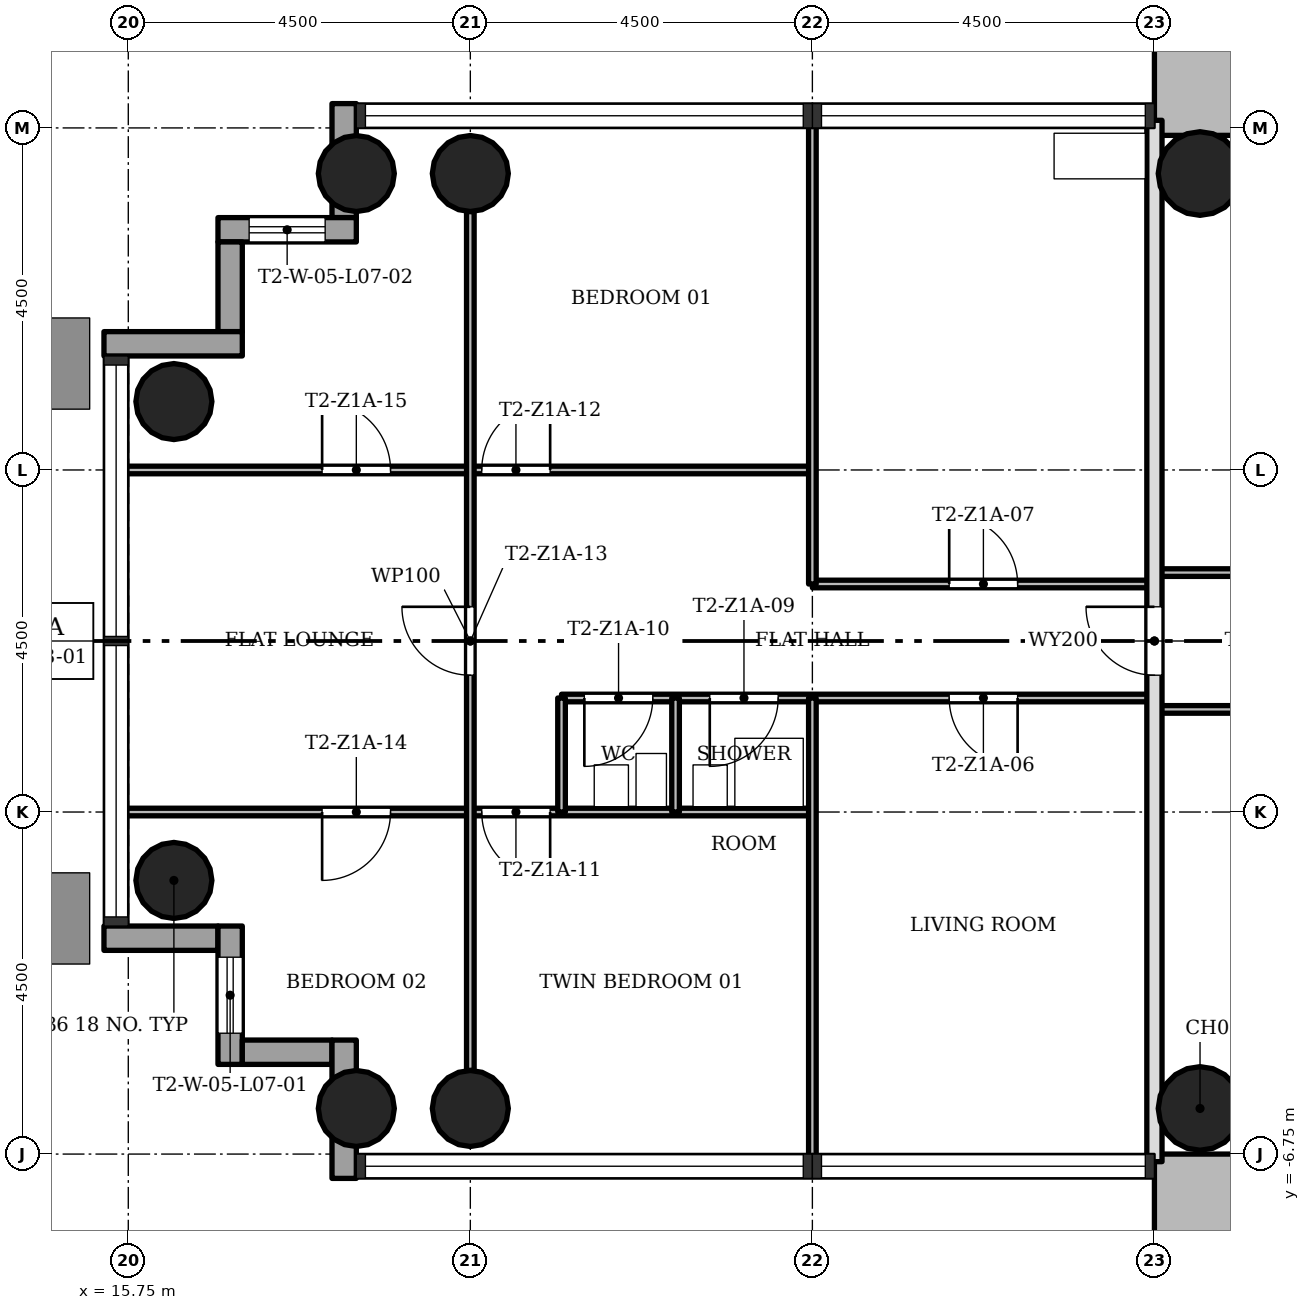
"""IFC4 building model, lengths in metres.
Left out: names, types, materials, properties, quantities, classifications, styles, units other than length and angle.
Written with IfcOpenShell. Run it as: python <this file> out.ifc"""

import sys

from ifc_helpers import new_model, si_unit, direction, frame, frame_2d, origin, origin_2d, place, context, subcontext, project, spatial, rectangle, hollow_circle, extrude, element, fill, save


model = new_model("IFC4")
c1 = context("Model", 3, precision=1e-05, world=origin(), true_north=direction((0.0, 1.0)))
c2 = subcontext(c1, "Body", "Model", "MODEL_VIEW")
j1 = project(units=[si_unit("LENGTHUNIT", "METRE"), si_unit("PLANEANGLEUNIT", "RADIAN")], contexts=[c1])
p1 = place(None, origin())
s1 = spatial("IfcSite", under=j1, at=p1, CompositionType="ELEMENT")
p2 = place(p1, origin())
s2 = spatial("IfcBuilding", under=s1, at=p2, CompositionType="ELEMENT")
p3 = place(p2, frame((0.0, 0.0, 31.3)))
s3 = spatial("IfcBuildingStorey", under=s2, at=p3, CompositionType="ELEMENT", Elevation=31.3)
p4 = place(p3, frame((29.8, 15.248, 0.0), z_axis=(0.0, 0.0, 1.0), x_axis=(0.0, -1.0, 0.0)))
e1 = element("IfcWall", 1, at=p4, inside=s3, PredefinedType="SHEAR", context=c2, shape_type="SweptSolid", body=[
    extrude(rectangle(XDim=8.596, YDim=1.1, at=frame_2d((4.298, 0.0))), origin(), (0.0, 0.0, 1.0), 3.4),
])
p5 = place(p3, frame((41.65, -7.3, 0.0), z_axis=(0.0, 0.0, 1.0), x_axis=(-1.0, 0.0, 0.0)))
e2 = element("IfcWall", 2, at=p5, inside=s3, PredefinedType="SHEAR", context=c2, shape_type="SweptSolid", body=[
    extrude(rectangle(XDim=12.4, YDim=1.1, at=frame_2d((6.2, 0.0))), origin(), (0.0, 0.0, 1.0), 3.4),
])
p6 = place(p5, frame((4.75, 0.0, 0.0)))
e3 = element("IfcOpeningElement", 3, at=p6, cuts=e2, PredefinedType="OPENING", context=c2, shape_type="SweptSolid", body=[
    extrude(rectangle(XDim=1.8, YDim=2.1, at=frame_2d((0.9, 1.05))), frame((0.0, 0.56, 0.0), z_axis=(0.0, -1.0, 0.0), x_axis=(1.0, 0.0, 0.0)), (0.0, 0.0, 1.0), 1.12),
])
for number, where, z_axis, x_axis in (
    (4, (20.25, 6.15, 0.0), (0.0, 0.0, 1.0), (1.0, 0.0, 0.0)),
    (5, (20.25, -6.15, 0.0), (0.0, 0.0, 1.0), (1.0, 0.0, 0.0)),
    (6, (18.75, 6.15, 0.0), (0.0, 0.0, 1.0), (1.0, 0.0, 0.0)),
    (7, (18.75, -6.15, 0.0), (0.0, 0.0, 1.0), (1.0, 0.0, 0.0)),
    (8, (16.35, 3.15, 0.0), (0.0, 0.0, 1.0), (1.0, 0.0, 0.0)),
    (9, (16.35, -3.15, 0.0), (0.0, 0.0, 1.0), (1.0, 0.0, 0.0)),
):
    element("IfcColumn", number, at=place(p3, frame(where, z_axis=z_axis, x_axis=x_axis)), inside=s3, PredefinedType="COLUMN", context=c2, shape_type="SweptSolid", body=[
        extrude(hollow_circle(Radius=0.5, WallThickness=0.036, at=origin_2d()), origin(), (0.0, 0.0, 1.0), 3.4),
    ])
for number, where, z_axis, x_axis in (
    (10, (29.85, 6.15, 0.0), (0.0, 0.0, 1.0), (1.0, 0.0, 0.0)),
    (11, (29.85, -6.15, 0.0), (0.0, 0.0, 1.0), (1.0, 0.0, 0.0)),
):
    element("IfcColumn", number, at=place(p3, frame(where, z_axis=z_axis, x_axis=x_axis)), inside=s3, PredefinedType="COLUMN", context=c2, shape_type="SweptSolid", body=[
        extrude(hollow_circle(Radius=0.55, WallThickness=0.04, at=origin_2d()), origin(), (0.0, 0.0, 1.0), 3.4),
    ])
p7 = place(p3, frame((18.59, 7.07, -0.3), z_axis=(0.0, 0.0, 1.0), x_axis=(0.0, -1.0, 0.0)))
e12 = element("IfcWall", 12, at=p7, inside=s3, PredefinedType="STANDARD", context=c2, shape_type="SweptSolid", body=[
    extrude(rectangle(XDim=1.5, YDim=0.32, at=frame_2d((0.75, 0.0))), origin(), (0.0, 0.0, 1.0), 3.4),
])
p8 = place(p3, frame((18.75, 5.41, -0.3), z_axis=(0.0, 0.0, 1.0), x_axis=(-1.0, 0.0, 0.0)))
e13 = element("IfcWall", 13, at=p8, inside=s3, PredefinedType="STANDARD", context=c2, shape_type="SweptSolid", body=[
    extrude(rectangle(XDim=1.82, YDim=0.32, at=frame_2d((0.91, 0.0))), origin(), (0.0, 0.0, 1.0), 3.4),
])
p9 = place(p8, frame((0.41, 0.0, 1.2)))
e14 = element("IfcOpeningElement", 14, at=p9, cuts=e13, PredefinedType="OPENING", context=c2, shape_type="SweptSolid", body=[
    extrude(rectangle(XDim=1.0, YDim=1.5, at=frame_2d((0.5, 0.75))), frame((0.0, 0.17, 0.0), z_axis=(0.0, -1.0, 0.0), x_axis=(1.0, 0.0, 0.0)), (0.0, 0.0, 1.0), 0.34),
])
p10 = place(p3, frame((17.09, 5.25, -0.3), z_axis=(0.0, 0.0, 1.0), x_axis=(0.0, -1.0, 0.0)))
e15 = element("IfcWall", 15, at=p10, inside=s3, PredefinedType="STANDARD", context=c2, shape_type="SweptSolid", body=[
    extrude(rectangle(XDim=1.18, YDim=0.32, at=frame_2d((0.59, 0.0))), origin(), (0.0, 0.0, 1.0), 3.4),
])
p11 = place(p3, frame((17.25, 3.91, -0.3), z_axis=(0.0, 0.0, 1.0), x_axis=(-1.0, 0.0, 0.0)))
e16 = element("IfcWall", 16, at=p11, inside=s3, PredefinedType="STANDARD", context=c2, shape_type="SweptSolid", body=[
    extrude(rectangle(XDim=1.82, YDim=0.32, at=frame_2d((0.91, 0.0))), origin(), (0.0, 0.0, 1.0), 3.4),
])
p12 = place(p3, frame((15.43, -3.91, -0.3), z_axis=(0.0, 0.0, 1.0), x_axis=(1.0, 0.0, 0.0)))
e17 = element("IfcWall", 17, at=p12, inside=s3, PredefinedType="STANDARD", context=c2, shape_type="SweptSolid", body=[
    extrude(rectangle(XDim=1.5, YDim=0.32, at=frame_2d((0.75, 0.0))), origin(), (0.0, 0.0, 1.0), 3.4),
])
p13 = place(p3, frame((17.09, -3.75, -0.3), z_axis=(0.0, 0.0, 1.0), x_axis=(0.0, -1.0, 0.0)))
e18 = element("IfcWall", 18, at=p13, inside=s3, PredefinedType="STANDARD", context=c2, shape_type="SweptSolid", body=[
    extrude(rectangle(XDim=1.82, YDim=0.32, at=frame_2d((0.91, 0.0))), origin(), (0.0, 0.0, 1.0), 3.4),
])
p14 = place(p13, frame((0.41, 0.0, 1.2)))
e19 = element("IfcOpeningElement", 19, at=p14, cuts=e18, PredefinedType="OPENING", context=c2, shape_type="SweptSolid", body=[
    extrude(rectangle(XDim=1.0, YDim=1.5, at=frame_2d((0.5, 0.75))), frame((0.0, 0.17, 0.0), z_axis=(0.0, -1.0, 0.0), x_axis=(1.0, 0.0, 0.0)), (0.0, 0.0, 1.0), 0.34),
])
p15 = place(p3, frame((17.25, -5.41, -0.3), z_axis=(0.0, 0.0, 1.0), x_axis=(1.0, 0.0, 0.0)))
e20 = element("IfcWall", 20, at=p15, inside=s3, PredefinedType="STANDARD", context=c2, shape_type="SweptSolid", body=[
    extrude(rectangle(XDim=1.18, YDim=0.32, at=frame_2d((0.59, 0.0))), origin(), (0.0, 0.0, 1.0), 3.4),
])
p16 = place(p3, frame((18.59, -5.25, -0.3), z_axis=(0.0, 0.0, 1.0), x_axis=(0.0, -1.0, 0.0)))
e21 = element("IfcWall", 21, at=p16, inside=s3, PredefinedType="STANDARD", context=c2, shape_type="SweptSolid", body=[
    extrude(rectangle(XDim=1.82, YDim=0.32, at=frame_2d((0.91, 0.0))), origin(), (0.0, 0.0, 1.0), 3.4),
])
p17 = place(p3, frame((24.75, -2.25, 0.0), z_axis=(0.0, 0.0, 1.0), x_axis=(-1.0, 0.0, 0.0)))
e22 = element("IfcWall", 22, at=p17, inside=s3, PredefinedType="PARTITIONING", context=c2, shape_type="SweptSolid", body=[
    extrude(rectangle(XDim=9.1, YDim=0.1, at=frame_2d((4.55, 0.0))), origin(), (0.0, 0.0, 1.0), 3.0),
])
p18 = place(p17, frame((3.45, 0.0, 0.0)))
e23 = element("IfcOpeningElement", 23, at=p18, cuts=e22, PredefinedType="OPENING", context=c2, shape_type="SweptSolid", body=[
    extrude(rectangle(XDim=0.9, YDim=2.1, at=frame_2d((0.45, 1.05))), frame((0.0, 0.06, 0.0), z_axis=(0.0, -1.0, 0.0), x_axis=(1.0, 0.0, 0.0)), (0.0, 0.0, 1.0), 0.12),
])
p19 = place(p17, frame((5.55, 0.0, 0.0)))
e24 = element("IfcOpeningElement", 24, at=p19, cuts=e22, PredefinedType="OPENING", context=c2, shape_type="SweptSolid", body=[
    extrude(rectangle(XDim=0.9, YDim=2.1, at=frame_2d((0.45, 1.05))), frame((0.0, 0.06, 0.0), z_axis=(0.0, -1.0, 0.0), x_axis=(1.0, 0.0, 0.0)), (0.0, 0.0, 1.0), 0.12),
])
p20 = place(p3, frame((34.5, -0.9, 0.0), z_axis=(0.0, 0.0, 1.0), x_axis=(-1.0, 0.0, 0.0)))
e25 = element("IfcWall", 25, at=p20, inside=s3, PredefinedType="PARTITIONING", context=c2, shape_type="SweptSolid", body=[
    extrude(rectangle(XDim=5.25, YDim=0.1, at=frame_2d((2.625, 0.0))), origin(), (0.0, 0.0, 1.0), 3.0),
])
p21 = place(p3, frame((29.25, -0.75, 0.0), z_axis=(0.0, 0.0, 1.0), x_axis=(-1.0, 0.0, 0.0)))
e26 = element("IfcWall", 26, at=p21, inside=s3, PredefinedType="PARTITIONING", context=c2, shape_type="SweptSolid", body=[
    extrude(rectangle(XDim=7.8, YDim=0.1, at=frame_2d((3.9, 0.0))), origin(), (0.0, 0.0, 1.0), 3.0),
])
p22 = place(p21, frame((1.8, 0.0, 0.0)))
e27 = element("IfcOpeningElement", 27, at=p22, cuts=e26, PredefinedType="OPENING", context=c2, shape_type="SweptSolid", body=[
    extrude(rectangle(XDim=0.9, YDim=2.1, at=frame_2d((0.45, 1.05))), frame((0.0, 0.06, 0.0), z_axis=(0.0, -1.0, 0.0), x_axis=(1.0, 0.0, 0.0)), (0.0, 0.0, 1.0), 0.12),
])
p23 = place(p21, frame((4.95, 0.0, 0.0)))
e28 = element("IfcOpeningElement", 28, at=p23, cuts=e26, PredefinedType="OPENING", context=c2, shape_type="SweptSolid", body=[
    extrude(rectangle(XDim=0.9, YDim=2.1, at=frame_2d((0.45, 1.05))), frame((0.0, 0.06, 0.0), z_axis=(0.0, -1.0, 0.0), x_axis=(1.0, 0.0, 0.0)), (0.0, 0.0, 1.0), 0.12),
])
p24 = place(p21, frame((6.6, 0.0, 0.0)))
e29 = element("IfcOpeningElement", 29, at=p24, cuts=e26, PredefinedType="OPENING", context=c2, shape_type="SweptSolid", body=[
    extrude(rectangle(XDim=0.9, YDim=2.1, at=frame_2d((0.45, 1.05))), frame((0.0, 0.06, 0.0), z_axis=(0.0, -1.0, 0.0), x_axis=(1.0, 0.0, 0.0)), (0.0, 0.0, 1.0), 0.12),
])
p25 = place(p3, frame((29.25, 0.75, 0.0), z_axis=(0.0, 0.0, 1.0), x_axis=(-1.0, 0.0, 0.0)))
e30 = element("IfcWall", 30, at=p25, inside=s3, PredefinedType="PARTITIONING", context=c2, shape_type="SweptSolid", body=[
    extrude(rectangle(XDim=4.5, YDim=0.1, at=frame_2d((2.25, 0.0))), origin(), (0.0, 0.0, 1.0), 3.0),
])
p26 = place(p25, frame((1.8, 0.0, 0.0)))
e31 = element("IfcOpeningElement", 31, at=p26, cuts=e30, PredefinedType="OPENING", context=c2, shape_type="SweptSolid", body=[
    extrude(rectangle(XDim=0.9, YDim=2.1, at=frame_2d((0.45, 1.05))), frame((0.0, 0.06, 0.0), z_axis=(0.0, -1.0, 0.0), x_axis=(1.0, 0.0, 0.0)), (0.0, 0.0, 1.0), 0.12),
])
p27 = place(p3, frame((34.5, 0.9, 0.0), z_axis=(0.0, 0.0, 1.0), x_axis=(-1.0, 0.0, 0.0)))
e32 = element("IfcWall", 32, at=p27, inside=s3, PredefinedType="PARTITIONING", context=c2, shape_type="SweptSolid", body=[
    extrude(rectangle(XDim=5.25, YDim=0.1, at=frame_2d((2.625, 0.0))), origin(), (0.0, 0.0, 1.0), 3.0),
])
p28 = place(p3, frame((24.75, 2.25, 0.0), z_axis=(0.0, 0.0, 1.0), x_axis=(-1.0, 0.0, 0.0)))
e33 = element("IfcWall", 33, at=p28, inside=s3, PredefinedType="PARTITIONING", context=c2, shape_type="SweptSolid", body=[
    extrude(rectangle(XDim=9.1, YDim=0.1, at=frame_2d((4.55, 0.0))), origin(), (0.0, 0.0, 1.0), 3.0),
])
p29 = place(p28, frame((3.45, 0.0, 0.0)))
e34 = element("IfcOpeningElement", 34, at=p29, cuts=e33, PredefinedType="OPENING", context=c2, shape_type="SweptSolid", body=[
    extrude(rectangle(XDim=0.9, YDim=2.1, at=frame_2d((0.45, 1.05))), frame((0.0, 0.06, 0.0), z_axis=(0.0, -1.0, 0.0), x_axis=(1.0, 0.0, 0.0)), (0.0, 0.0, 1.0), 0.12),
])
p30 = place(p28, frame((5.55, 0.0, 0.0)))
e35 = element("IfcOpeningElement", 35, at=p30, cuts=e33, PredefinedType="OPENING", context=c2, shape_type="SweptSolid", body=[
    extrude(rectangle(XDim=0.9, YDim=2.1, at=frame_2d((0.45, 1.05))), frame((0.0, 0.06, 0.0), z_axis=(0.0, -1.0, 0.0), x_axis=(1.0, 0.0, 0.0)), (0.0, 0.0, 1.0), 0.12),
])
p31 = place(p3, frame((29.25, -6.85, 0.0), z_axis=(0.0, 0.0, 1.0), x_axis=(0.0, 1.0, 0.0)))
e36 = element("IfcWall", 36, at=p31, inside=s3, PredefinedType="SOLIDWALL", context=c2, shape_type="SweptSolid", body=[
    extrude(rectangle(XDim=13.7, YDim=0.2, at=frame_2d((6.85, 0.0))), origin(), (0.0, 0.0, 1.0), 3.0),
])
p32 = place(p31, frame((6.4, 0.0, 0.0)))
e37 = element("IfcOpeningElement", 37, at=p32, cuts=e36, PredefinedType="OPENING", context=c2, shape_type="SweptSolid", body=[
    extrude(rectangle(XDim=0.9, YDim=2.1, at=frame_2d((0.45, 1.05))), frame((0.0, 0.11, 0.0), z_axis=(0.0, -1.0, 0.0), x_axis=(1.0, 0.0, 0.0)), (0.0, 0.0, 1.0), 0.22),
])
for number, where, z_axis, x_axis in (
    (38, (24.75, -6.85, 0.0), (0.0, 0.0, 1.0), (0.0, 1.0, 0.0)),
    (39, (24.75, 0.75, 0.0), (0.0, 0.0, 1.0), (0.0, 1.0, 0.0)),
):
    element("IfcWall", number, at=place(p3, frame(where, z_axis=z_axis, x_axis=x_axis)), inside=s3, PredefinedType="PARTITIONING", context=c2, shape_type="SweptSolid", body=[
        extrude(rectangle(XDim=6.1, YDim=0.1, at=frame_2d((3.05, 0.0))), origin(), (0.0, 0.0, 1.0), 3.0),
    ])
for number, where, z_axis, x_axis in (
    (40, (22.95, -2.25, 0.0), (0.0, 0.0, 1.0), (0.0, 1.0, 0.0)),
    (41, (21.45, -2.25, 0.0), (0.0, 0.0, 1.0), (0.0, 1.0, 0.0)),
):
    element("IfcWall", number, at=place(p3, frame(where, z_axis=z_axis, x_axis=x_axis)), inside=s3, PredefinedType="PARTITIONING", context=c2, shape_type="SweptSolid", body=[
        extrude(rectangle(XDim=1.5, YDim=0.1, at=frame_2d((0.75, 0.0))), origin(), (0.0, 0.0, 1.0), 3.0),
    ])
p33 = place(p3, frame((20.25, -5.65, 0.0), z_axis=(0.0, 0.0, 1.0), x_axis=(0.0, 1.0, 0.0)))
e42 = element("IfcWall", 42, at=p33, inside=s3, PredefinedType="PARTITIONING", context=c2, shape_type="SweptSolid", body=[
    extrude(rectangle(XDim=11.3, YDim=0.1, at=frame_2d((5.65, 0.0))), origin(), (0.0, 0.0, 1.0), 3.0),
])
p34 = place(p33, frame((5.2, 0.0, 0.0)))
e43 = element("IfcOpeningElement", 43, at=p34, cuts=e42, PredefinedType="OPENING", context=c2, shape_type="SweptSolid", body=[
    extrude(rectangle(XDim=0.9, YDim=2.1, at=frame_2d((0.45, 1.05))), frame((0.0, 0.06, 0.0), z_axis=(0.0, -1.0, 0.0), x_axis=(1.0, 0.0, 0.0)), (0.0, 0.0, 1.0), 0.12),
])
p35 = place(p22, origin())
e44 = element("IfcDoor", 44, at=p35, inside=s3, OperationType="SINGLE_SWING_RIGHT", PredefinedType="DOOR", context=c2, shape_type="SweptSolid", body=[
    extrude(rectangle(XDim=0.9, YDim=2.1, at=frame_2d((0.45, 1.05))), frame((0.0, 0.025, 0.0), z_axis=(0.0, -1.0, 0.0), x_axis=(1.0, 0.0, 0.0)), (0.0, 0.0, 1.0), 0.05),
])
fill(e27, e44)
p36 = place(p26, origin())
e45 = element("IfcDoor", 45, at=p36, inside=s3, OperationType="SINGLE_SWING_RIGHT", PredefinedType="DOOR", context=c2, shape_type="SweptSolid", body=[
    extrude(rectangle(XDim=0.9, YDim=2.1, at=frame_2d((0.45, 1.05))), frame((0.0, 0.025, 0.0), z_axis=(0.0, -1.0, 0.0), x_axis=(1.0, 0.0, 0.0)), (0.0, 0.0, 1.0), 0.05),
])
fill(e31, e45)
p37 = place(p32, origin())
e46 = element("IfcDoor", 46, at=p37, inside=s3, OperationType="SINGLE_SWING_LEFT", PredefinedType="DOOR", context=c2, shape_type="SweptSolid", body=[
    extrude(rectangle(XDim=0.9, YDim=2.1, at=frame_2d((0.45, 1.05))), frame((0.0, 0.025, 0.0), z_axis=(0.0, -1.0, 0.0), x_axis=(1.0, 0.0, 0.0)), (0.0, 0.0, 1.0), 0.05),
])
fill(e37, e46)
p38 = place(p23, origin())
e47 = element("IfcDoor", 47, at=p38, inside=s3, OperationType="SINGLE_SWING_LEFT", PredefinedType="DOOR", context=c2, shape_type="SweptSolid", body=[
    extrude(rectangle(XDim=0.9, YDim=2.1, at=frame_2d((0.45, 1.05))), frame((0.0, 0.025, 0.0), z_axis=(0.0, -1.0, 0.0), x_axis=(1.0, 0.0, 0.0)), (0.0, 0.0, 1.0), 0.05),
])
fill(e28, e47)
p39 = place(p24, origin())
e48 = element("IfcDoor", 48, at=p39, inside=s3, OperationType="SINGLE_SWING_LEFT", PredefinedType="DOOR", context=c2, shape_type="SweptSolid", body=[
    extrude(rectangle(XDim=0.9, YDim=2.1, at=frame_2d((0.45, 1.05))), frame((0.0, 0.025, 0.0), z_axis=(0.0, -1.0, 0.0), x_axis=(1.0, 0.0, 0.0)), (0.0, 0.0, 1.0), 0.05),
])
fill(e29, e48)
p40 = place(p18, origin())
e49 = element("IfcDoor", 49, at=p40, inside=s3, OperationType="SINGLE_SWING_RIGHT", PredefinedType="DOOR", context=c2, shape_type="SweptSolid", body=[
    extrude(rectangle(XDim=0.9, YDim=2.1, at=frame_2d((0.45, 1.05))), frame((0.0, 0.025, 0.0), z_axis=(0.0, -1.0, 0.0), x_axis=(1.0, 0.0, 0.0)), (0.0, 0.0, 1.0), 0.05),
])
fill(e23, e49)
p41 = place(p29, origin())
e50 = element("IfcDoor", 50, at=p41, inside=s3, OperationType="SINGLE_SWING_LEFT", PredefinedType="DOOR", context=c2, shape_type="SweptSolid", body=[
    extrude(rectangle(XDim=0.9, YDim=2.1, at=frame_2d((0.45, 1.05))), frame((0.0, 0.025, 0.0), z_axis=(0.0, -1.0, 0.0), x_axis=(1.0, 0.0, 0.0)), (0.0, 0.0, 1.0), 0.05),
])
fill(e34, e50)
p42 = place(p34, origin())
e51 = element("IfcDoor", 51, at=p42, inside=s3, OperationType="SINGLE_SWING_LEFT", PredefinedType="DOOR", context=c2, shape_type="SweptSolid", body=[
    extrude(rectangle(XDim=0.9, YDim=2.1, at=frame_2d((0.45, 1.05))), frame((0.0, 0.025, 0.0), z_axis=(0.0, -1.0, 0.0), x_axis=(1.0, 0.0, 0.0)), (0.0, 0.0, 1.0), 0.05),
])
fill(e43, e51)
p43 = place(p19, origin())
e52 = element("IfcDoor", 52, at=p43, inside=s3, OperationType="SINGLE_SWING_LEFT", PredefinedType="DOOR", context=c2, shape_type="SweptSolid", body=[
    extrude(rectangle(XDim=0.9, YDim=2.1, at=frame_2d((0.45, 1.05))), frame((0.0, 0.025, 0.0), z_axis=(0.0, -1.0, 0.0), x_axis=(1.0, 0.0, 0.0)), (0.0, 0.0, 1.0), 0.05),
])
fill(e24, e52)
p44 = place(p30, origin())
e53 = element("IfcDoor", 53, at=p44, inside=s3, OperationType="SINGLE_SWING_RIGHT", PredefinedType="DOOR", context=c2, shape_type="SweptSolid", body=[
    extrude(rectangle(XDim=0.9, YDim=2.1, at=frame_2d((0.45, 1.05))), frame((0.0, 0.025, 0.0), z_axis=(0.0, -1.0, 0.0), x_axis=(1.0, 0.0, 0.0)), (0.0, 0.0, 1.0), 0.05),
])
fill(e35, e53)
p45 = place(p14, origin())
e54 = element("IfcWindow", 54, at=p45, inside=s3, PartitioningType="SINGLE_PANEL", PredefinedType="WINDOW", context=c2, shape_type="SweptSolid", body=[
    extrude(rectangle(XDim=1.0, YDim=1.5, at=frame_2d((0.5, 0.75))), frame((0.0, 0.03, 0.0), z_axis=(0.0, -1.0, 0.0), x_axis=(1.0, 0.0, 0.0)), (0.0, 0.0, 1.0), 0.06),
])
fill(e19, e54)
p46 = place(p9, origin())
e55 = element("IfcWindow", 55, at=p46, inside=s3, PartitioningType="SINGLE_PANEL", PredefinedType="WINDOW", context=c2, shape_type="SweptSolid", body=[
    extrude(rectangle(XDim=1.0, YDim=1.5, at=frame_2d((0.5, 0.75))), frame((0.0, 0.03, 0.0), z_axis=(0.0, -1.0, 0.0), x_axis=(1.0, 0.0, 0.0)), (0.0, 0.0, 1.0), 0.06),
])
fill(e14, e55)
save(model, sys.argv[1])
